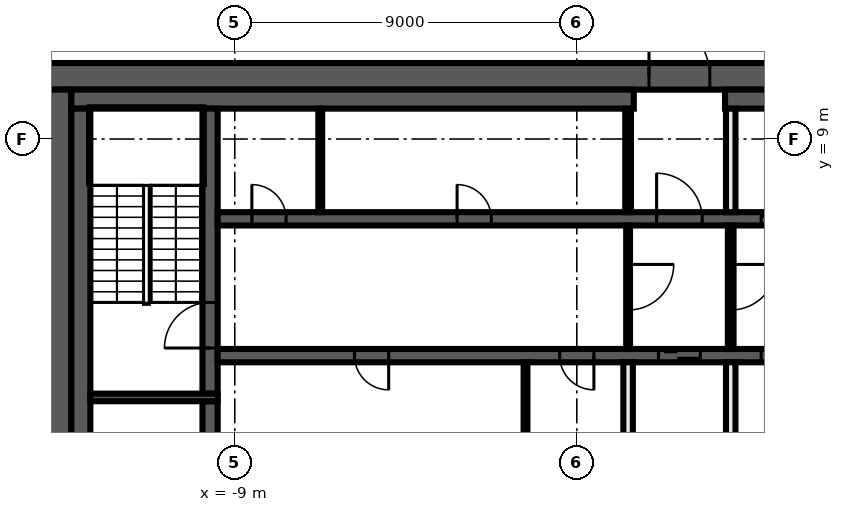
"""IFC4 building model, lengths in metres.
Left out: names, types, materials, properties, quantities, classifications, styles, units other than length and angle.
Written with IfcOpenShell. Run it as: python <this file> out.ifc"""

import sys

from ifc_helpers import new_model, si_unit, direction, frame, frame_2d, origin, place, context, subcontext, project, spatial, rectangle, extrude, element, fill, save


model = new_model("IFC4")
c1 = context("Model", 3, precision=1e-05, world=origin(), true_north=direction((0.0, 1.0)))
c2 = subcontext(c1, "Body", "Model", "MODEL_VIEW")
j1 = project(units=[si_unit("LENGTHUNIT", "METRE"), si_unit("PLANEANGLEUNIT", "RADIAN")], contexts=[c1])
p1 = place(None, origin())
s1 = spatial("IfcSite", under=j1, at=p1, CompositionType="ELEMENT")
p2 = place(p1, origin())
s2 = spatial("IfcBuilding", under=s1, at=p2, CompositionType="ELEMENT")
p3 = place(p2, frame((0.0, 0.0, 262.2)))
s3 = spatial("IfcBuildingStorey", under=s2, at=p3, CompositionType="ELEMENT", Elevation=262.2)
p4 = place(p3, frame((-14.0, 10.65, 0.0), z_axis=(0.0, 0.0, 1.0), x_axis=(1.0, 0.0, 0.0)))
e1 = element("IfcWall", 1, at=p4, inside=s3, PredefinedType="SHEAR", context=c2, shape_type="SweptSolid", body=[
    extrude(rectangle(XDim=28.0, YDim=0.7, at=frame_2d((14.0, 0.0))), origin(), (0.0, 0.0, 1.0), 3.82),
])
p5 = place(p4, frame((15.9, 0.0, 0.0)))
e2 = element("IfcOpeningElement", 2, at=p5, cuts=e1, PredefinedType="OPENING", context=c2, shape_type="SweptSolid", body=[
    extrude(rectangle(XDim=1.6, YDim=2.1, at=frame_2d((0.8, 1.05))), frame((0.0, 0.36, 0.0), z_axis=(0.0, -1.0, 0.0), x_axis=(1.0, 0.0, 0.0)), (0.0, 0.0, 1.0), 0.72),
])
p6 = place(p3, frame((-13.65, -10.3, 0.0), z_axis=(0.0, 0.0, 1.0), x_axis=(0.0, 1.0, 0.0)))
e3 = element("IfcWall", 3, at=p6, inside=s3, PredefinedType="SHEAR", context=c2, shape_type="SweptSolid", body=[
    extrude(rectangle(XDim=20.6, YDim=0.7, at=frame_2d((10.3, 0.0))), origin(), (0.0, 0.0, 1.0), 3.82),
])
p7 = place(p3, frame((-13.3, 10.05, 0.0), z_axis=(0.0, 0.0, 1.0), x_axis=(1.0, 0.0, 0.0)))
e4 = element("IfcWall", 4, at=p7, inside=s3, PredefinedType="SHEAR", context=c2, shape_type="SweptSolid", body=[
    extrude(rectangle(XDim=14.8, YDim=0.5, at=frame_2d((7.4, 0.0))), origin(), (0.0, 0.0, 1.0), 3.82),
])
p8 = place(p3, frame((3.9, 10.05, 0.0), z_axis=(0.0, 0.0, 1.0), x_axis=(1.0, 0.0, 0.0)))
e5 = element("IfcWall", 5, at=p8, inside=s3, PredefinedType="SHEAR", context=c2, shape_type="SweptSolid", body=[
    extrude(rectangle(XDim=9.4, YDim=0.5, at=frame_2d((4.7, 0.0))), origin(), (0.0, 0.0, 1.0), 3.82),
])
p9 = place(p3, frame((-13.05, -9.8, 0.0), z_axis=(0.0, 0.0, 1.0), x_axis=(0.0, 1.0, 0.0)))
e6 = element("IfcWall", 6, at=p9, inside=s3, PredefinedType="SHEAR", context=c2, shape_type="SweptSolid", body=[
    extrude(rectangle(XDim=19.6, YDim=0.5, at=frame_2d((9.8, 0.0))), origin(), (0.0, 0.0, 1.0), 3.82),
])
p10 = place(p3, frame((-9.65, -2.1, 0.0), z_axis=(0.0, 0.0, 1.0), x_axis=(0.0, 1.0, 0.0)))
e7 = element("IfcWall", 7, at=p10, inside=s3, PredefinedType="SHEAR", context=c2, shape_type="SweptSolid", body=[
    extrude(rectangle(XDim=4.2, YDim=0.4, at=frame_2d((2.1, 0.0))), origin(), (0.0, 0.0, 1.0), 3.82),
])
p11 = place(p3, frame((-9.65, 2.3, 0.0), z_axis=(0.0, 0.0, 1.0), x_axis=(0.0, 1.0, 0.0)))
e8 = element("IfcWall", 8, at=p11, inside=s3, PredefinedType="SHEAR", context=c2, shape_type="SweptSolid", body=[
    extrude(rectangle(XDim=7.5, YDim=0.4, at=frame_2d((3.75, 0.0))), origin(), (0.0, 0.0, 1.0), 3.82),
])
p12 = place(p11, frame((1.2, 0.0, 0.0)))
e9 = element("IfcOpeningElement", 9, at=p12, cuts=e8, PredefinedType="OPENING", context=c2, shape_type="SweptSolid", body=[
    extrude(rectangle(XDim=1.2, YDim=2.1, at=frame_2d((0.6, 1.05))), frame((0.0, 0.21, 0.0), z_axis=(0.0, -1.0, 0.0), x_axis=(1.0, 0.0, 0.0)), (0.0, 0.0, 1.0), 0.42),
])
p13 = place(p3, frame((-9.45, 2.2, 0.0), z_axis=(0.0, 0.0, 1.0), x_axis=(-1.0, 0.0, 0.0)))
e10 = element("IfcWall", 10, at=p13, inside=s3, PredefinedType="SHEAR", context=c2, shape_type="SweptSolid", body=[
    extrude(rectangle(XDim=3.35, YDim=0.2, at=frame_2d((1.675, 0.0))), origin(), (0.0, 0.0, 1.0), 3.82),
])
p14 = place(p3, frame((-9.45, 6.9, 0.0), z_axis=(0.0, 0.0, 1.0), x_axis=(1.0, 0.0, 0.0)))
e11 = element("IfcWall", 11, at=p14, inside=s3, PredefinedType="SHEAR", context=c2, shape_type="SweptSolid", body=[
    extrude(rectangle(XDim=18.9, YDim=0.35, at=frame_2d((9.45, 0.0))), origin(), (0.0, 0.0, 1.0), 3.82),
])
p15 = place(p14, frame((11.55, 0.0, 0.0)))
e12 = element("IfcOpeningElement", 12, at=p15, cuts=e11, PredefinedType="OPENING", context=c2, shape_type="SweptSolid", body=[
    extrude(rectangle(XDim=1.2, YDim=2.1, at=frame_2d((0.6, 1.05))), frame((0.0, 0.185, 0.0), z_axis=(0.0, -1.0, 0.0), x_axis=(1.0, 0.0, 0.0)), (0.0, 0.0, 1.0), 0.37),
])
p16 = place(p14, frame((14.3, 0.0, 0.0)))
e13 = element("IfcOpeningElement", 13, at=p16, cuts=e11, PredefinedType="OPENING", context=c2, shape_type="SweptSolid", body=[
    extrude(rectangle(XDim=1.1, YDim=2.1, at=frame_2d((0.55, 1.05))), frame((0.0, 0.185, 0.0), z_axis=(0.0, -1.0, 0.0), x_axis=(1.0, 0.0, 0.0)), (0.0, 0.0, 1.0), 0.37),
])
p17 = place(p14, frame((17.0, 0.0, 0.0)))
e14 = element("IfcOpeningElement", 14, at=p17, cuts=e11, PredefinedType="OPENING", context=c2, shape_type="SweptSolid", body=[
    extrude(rectangle(XDim=1.1, YDim=2.1, at=frame_2d((0.55, 1.05))), frame((0.0, 0.185, 0.0), z_axis=(0.0, -1.0, 0.0), x_axis=(1.0, 0.0, 0.0)), (0.0, 0.0, 1.0), 0.37),
])
p18 = place(p14, frame((0.9, 0.0, 0.0)))
e15 = element("IfcOpeningElement", 15, at=p18, cuts=e11, PredefinedType="OPENING", context=c2, shape_type="SweptSolid", body=[
    extrude(rectangle(XDim=0.9, YDim=2.1, at=frame_2d((0.45, 1.05))), frame((0.0, 0.185, 0.0), z_axis=(0.0, -1.0, 0.0), x_axis=(1.0, 0.0, 0.0)), (0.0, 0.0, 1.0), 0.37),
])
p19 = place(p14, frame((6.3, 0.0, 0.0)))
e16 = element("IfcOpeningElement", 16, at=p19, cuts=e11, PredefinedType="OPENING", context=c2, shape_type="SweptSolid", body=[
    extrude(rectangle(XDim=0.9, YDim=2.1, at=frame_2d((0.45, 1.05))), frame((0.0, 0.185, 0.0), z_axis=(0.0, -1.0, 0.0), x_axis=(1.0, 0.0, 0.0)), (0.0, 0.0, 1.0), 0.37),
])
p20 = place(p3, frame((9.45, 3.3, 0.0), z_axis=(0.0, 0.0, 1.0), x_axis=(-1.0, 0.0, 0.0)))
e17 = element("IfcWall", 17, at=p20, inside=s3, PredefinedType="SHEAR", context=c2, shape_type="SweptSolid", body=[
    extrude(rectangle(XDim=18.9, YDim=0.35, at=frame_2d((9.45, 0.0))), origin(), (0.0, 0.0, 1.0), 3.82),
])
p21 = place(p20, frame((6.2, 0.0, 0.0)))
e18 = element("IfcOpeningElement", 18, at=p21, cuts=e17, PredefinedType="OPENING", context=c2, shape_type="SweptSolid", body=[
    extrude(rectangle(XDim=1.1, YDim=2.1, at=frame_2d((0.55, 1.05))), frame((0.0, 0.185, 0.0), z_axis=(0.0, -1.0, 0.0), x_axis=(1.0, 0.0, 0.0)), (0.0, 0.0, 1.0), 0.37),
])
p22 = place(p20, frame((3.5, 0.0, 0.0)))
e19 = element("IfcOpeningElement", 19, at=p22, cuts=e17, PredefinedType="OPENING", context=c2, shape_type="SweptSolid", body=[
    extrude(rectangle(XDim=1.1, YDim=2.1, at=frame_2d((0.55, 1.05))), frame((0.0, 0.185, 0.0), z_axis=(0.0, -1.0, 0.0), x_axis=(1.0, 0.0, 0.0)), (0.0, 0.0, 1.0), 0.37),
])
p23 = place(p20, frame((0.9, 0.0, 0.0)))
e20 = element("IfcOpeningElement", 20, at=p23, cuts=e17, PredefinedType="OPENING", context=c2, shape_type="SweptSolid", body=[
    extrude(rectangle(XDim=0.9, YDim=2.1, at=frame_2d((0.45, 1.05))), frame((0.0, 0.185, 0.0), z_axis=(0.0, -1.0, 0.0), x_axis=(1.0, 0.0, 0.0)), (0.0, 0.0, 1.0), 0.37),
])
p24 = place(p20, frame((14.4, 0.0, 0.0)))
e21 = element("IfcOpeningElement", 21, at=p24, cuts=e17, PredefinedType="OPENING", context=c2, shape_type="SweptSolid", body=[
    extrude(rectangle(XDim=0.9, YDim=2.1, at=frame_2d((0.45, 1.05))), frame((0.0, 0.185, 0.0), z_axis=(0.0, -1.0, 0.0), x_axis=(1.0, 0.0, 0.0)), (0.0, 0.0, 1.0), 0.37),
])
p25 = place(p20, frame((9.0, 0.0, 0.0)))
e22 = element("IfcOpeningElement", 22, at=p25, cuts=e17, PredefinedType="OPENING", context=c2, shape_type="SweptSolid", body=[
    extrude(rectangle(XDim=0.9, YDim=2.1, at=frame_2d((0.45, 1.05))), frame((0.0, 0.185, 0.0), z_axis=(0.0, -1.0, 0.0), x_axis=(1.0, 0.0, 0.0)), (0.0, 0.0, 1.0), 0.37),
])
p26 = place(p3, frame((4.05, 6.725, 0.0), z_axis=(0.0, 0.0, 1.0), x_axis=(0.0, -1.0, 0.0)))
e23 = element("IfcWall", 23, at=p26, inside=s3, PredefinedType="PARTITIONING", context=c2, shape_type="SweptSolid", body=[
    extrude(rectangle(XDim=3.25, YDim=0.15, at=frame_2d((1.625, 0.0))), origin(), (0.0, 0.0, 1.0), 3.82),
])
p27 = place(p26, frame((1.025, 0.0, 0.0)))
e24 = element("IfcOpeningElement", 24, at=p27, cuts=e23, PredefinedType="OPENING", context=c2, shape_type="SweptSolid", body=[
    extrude(rectangle(XDim=1.2, YDim=2.1, at=frame_2d((0.6, 1.05))), frame((0.0, 0.085, 0.0), z_axis=(0.0, -1.0, 0.0), x_axis=(1.0, 0.0, 0.0)), (0.0, 0.0, 1.0), 0.17),
])
for number, where, z_axis, x_axis in (
    (25, (4.05, 0.4, 0.0), (0.0, 0.0, 1.0), (0.0, 1.0, 0.0)),
    (26, (4.05, 7.075, 0.0), (0.0, 0.0, 1.0), (0.0, 1.0, 0.0)),
):
    element("IfcWall", number, at=place(p3, frame(where, z_axis=z_axis, x_axis=x_axis)), inside=s3, PredefinedType="SOLIDWALL", context=c2, shape_type="SweptSolid", body=[
        extrude(rectangle(XDim=2.725, YDim=0.25, at=frame_2d((1.363, 0.0))), origin(), (0.0, 0.0, 1.0), 3.82),
    ])
p28 = place(p3, frame((1.35, 7.075, 0.0), z_axis=(0.0, 0.0, 1.0), x_axis=(0.0, 1.0, 0.0)))
e27 = element("IfcWall", 27, at=p28, inside=s3, PredefinedType="PARTITIONING", context=c2, shape_type="SweptSolid", body=[
    extrude(rectangle(XDim=2.725, YDim=0.15, at=frame_2d((1.363, 0.0))), origin(), (0.0, 0.0, 1.0), 3.82),
])
p29 = place(p3, frame((1.35, 6.725, 0.0), z_axis=(0.0, 0.0, 1.0), x_axis=(0.0, -1.0, 0.0)))
e28 = element("IfcWall", 28, at=p29, inside=s3, PredefinedType="PARTITIONING", context=c2, shape_type="SweptSolid", body=[
    extrude(rectangle(XDim=3.25, YDim=0.1, at=frame_2d((1.625, 0.0))), origin(), (0.0, 0.0, 1.0), 3.82),
])
p30 = place(p29, frame((1.025, 0.0, 0.0)))
e29 = element("IfcOpeningElement", 29, at=p30, cuts=e28, PredefinedType="OPENING", context=c2, shape_type="SweptSolid", body=[
    extrude(rectangle(XDim=1.2, YDim=2.1, at=frame_2d((0.6, 1.05))), frame((0.0, 0.06, 0.0), z_axis=(0.0, -1.0, 0.0), x_axis=(1.0, 0.0, 0.0)), (0.0, 0.0, 1.0), 0.12),
])
p31 = place(p3, frame((1.35, 0.4, 0.0), z_axis=(0.0, 0.0, 1.0), x_axis=(0.0, 1.0, 0.0)))
e30 = element("IfcWall", 30, at=p31, inside=s3, PredefinedType="SOLIDWALL", context=c2, shape_type="SweptSolid", body=[
    extrude(rectangle(XDim=2.725, YDim=0.25, at=frame_2d((1.363, 0.0))), origin(), (0.0, 0.0, 1.0), 3.82),
])
for number, where, z_axis, x_axis in (
    (31, (-1.35, 0.4, 0.0), (0.0, 0.0, 1.0), (0.0, 1.0, 0.0)),
    (32, (-6.75, 7.075, 0.0), (0.0, 0.0, 1.0), (0.0, 1.0, 0.0)),
):
    element("IfcWall", number, at=place(p3, frame(where, z_axis=z_axis, x_axis=x_axis)), inside=s3, PredefinedType="PARTITIONING", context=c2, shape_type="SweptSolid", body=[
        extrude(rectangle(XDim=2.725, YDim=0.1, at=frame_2d((1.363, 0.0))), origin(), (0.0, 0.0, 1.0), 3.82),
    ])
p32 = place(p5, origin())
e33 = element("IfcDoor", 33, at=p32, inside=s3, OperationType="DOUBLE_DOOR_SINGLE_SWING", PredefinedType="DOOR", context=c2, shape_type="SweptSolid", body=[
    extrude(rectangle(XDim=1.6, YDim=2.1, at=frame_2d((0.8, 1.05))), frame((0.0, 0.025, 0.0), z_axis=(0.0, -1.0, 0.0), x_axis=(1.0, 0.0, 0.0)), (0.0, 0.0, 1.0), 0.05),
])
fill(e2, e33)
p33 = place(p15, origin())
e34 = element("IfcDoor", 34, at=p33, inside=s3, OperationType="SINGLE_SWING_LEFT", PredefinedType="DOOR", context=c2, shape_type="SweptSolid", body=[
    extrude(rectangle(XDim=1.2, YDim=2.1, at=frame_2d((0.6, 1.05))), frame((0.0, 0.025, 0.0), z_axis=(0.0, -1.0, 0.0), x_axis=(1.0, 0.0, 0.0)), (0.0, 0.0, 1.0), 0.05),
])
fill(e12, e34)
p34 = place(p16, origin())
e35 = element("IfcDoor", 35, at=p34, inside=s3, OperationType="DOUBLE_DOOR_SLIDING", PredefinedType="DOOR", context=c2, shape_type="SweptSolid", body=[
    extrude(rectangle(XDim=1.1, YDim=2.1, at=frame_2d((0.55, 1.05))), frame((0.0, 0.025, 0.0), z_axis=(0.0, -1.0, 0.0), x_axis=(1.0, 0.0, 0.0)), (0.0, 0.0, 1.0), 0.05),
])
fill(e13, e35)
p35 = place(p21, origin())
e36 = element("IfcDoor", 36, at=p35, inside=s3, OperationType="DOUBLE_DOOR_SLIDING", PredefinedType="DOOR", context=c2, shape_type="SweptSolid", body=[
    extrude(rectangle(XDim=1.1, YDim=2.1, at=frame_2d((0.55, 1.05))), frame((0.0, 0.025, 0.0), z_axis=(0.0, -1.0, 0.0), x_axis=(1.0, 0.0, 0.0)), (0.0, 0.0, 1.0), 0.05),
])
fill(e18, e36)
p36 = place(p22, origin())
e37 = element("IfcDoor", 37, at=p36, inside=s3, OperationType="DOUBLE_DOOR_SLIDING", PredefinedType="DOOR", context=c2, shape_type="SweptSolid", body=[
    extrude(rectangle(XDim=1.1, YDim=2.1, at=frame_2d((0.55, 1.05))), frame((0.0, 0.025, 0.0), z_axis=(0.0, -1.0, 0.0), x_axis=(1.0, 0.0, 0.0)), (0.0, 0.0, 1.0), 0.05),
])
fill(e19, e37)
p37 = place(p18, origin())
e38 = element("IfcDoor", 38, at=p37, inside=s3, OperationType="SINGLE_SWING_RIGHT", PredefinedType="DOOR", context=c2, shape_type="SweptSolid", body=[
    extrude(rectangle(XDim=0.9, YDim=2.1, at=frame_2d((0.45, 1.05))), frame((0.0, 0.025, 0.0), z_axis=(0.0, -1.0, 0.0), x_axis=(1.0, 0.0, 0.0)), (0.0, 0.0, 1.0), 0.05),
])
fill(e15, e38)
p38 = place(p19, origin())
e39 = element("IfcDoor", 39, at=p38, inside=s3, OperationType="SINGLE_SWING_LEFT", PredefinedType="DOOR", context=c2, shape_type="SweptSolid", body=[
    extrude(rectangle(XDim=0.9, YDim=2.1, at=frame_2d((0.45, 1.05))), frame((0.0, 0.025, 0.0), z_axis=(0.0, -1.0, 0.0), x_axis=(1.0, 0.0, 0.0)), (0.0, 0.0, 1.0), 0.05),
])
fill(e16, e39)
p39 = place(p24, origin())
e40 = element("IfcDoor", 40, at=p39, inside=s3, OperationType="SINGLE_SWING_RIGHT", PredefinedType="DOOR", context=c2, shape_type="SweptSolid", body=[
    extrude(rectangle(XDim=0.9, YDim=2.1, at=frame_2d((0.45, 1.05))), frame((0.0, 0.025, 0.0), z_axis=(0.0, -1.0, 0.0), x_axis=(1.0, 0.0, 0.0)), (0.0, 0.0, 1.0), 0.05),
])
fill(e21, e40)
p40 = place(p25, origin())
e41 = element("IfcDoor", 41, at=p40, inside=s3, OperationType="SINGLE_SWING_LEFT", PredefinedType="DOOR", context=c2, shape_type="SweptSolid", body=[
    extrude(rectangle(XDim=0.9, YDim=2.1, at=frame_2d((0.45, 1.05))), frame((0.0, 0.025, 0.0), z_axis=(0.0, -1.0, 0.0), x_axis=(1.0, 0.0, 0.0)), (0.0, 0.0, 1.0), 0.05),
])
fill(e22, e41)
p41 = place(p12, origin())
e42 = element("IfcDoor", 42, at=p41, inside=s3, OperationType="SINGLE_SWING_RIGHT", PredefinedType="DOOR", context=c2, shape_type="SweptSolid", body=[
    extrude(rectangle(XDim=1.2, YDim=2.1, at=frame_2d((0.6, 1.05))), frame((0.0, 0.025, 0.0), z_axis=(0.0, -1.0, 0.0), x_axis=(1.0, 0.0, 0.0)), (0.0, 0.0, 1.0), 0.05),
])
fill(e9, e42)
p42 = place(p30, origin())
e43 = element("IfcDoor", 43, at=p42, inside=s3, OperationType="SINGLE_SWING_LEFT", PredefinedType="DOOR", context=c2, shape_type="SweptSolid", body=[
    extrude(rectangle(XDim=1.2, YDim=2.1, at=frame_2d((0.6, 1.05))), frame((0.0, 0.025, 0.0), z_axis=(0.0, -1.0, 0.0), x_axis=(1.0, 0.0, 0.0)), (0.0, 0.0, 1.0), 0.05),
])
fill(e29, e43)
p43 = place(p27, origin())
e44 = element("IfcDoor", 44, at=p43, inside=s3, OperationType="SINGLE_SWING_RIGHT", PredefinedType="DOOR", context=c2, shape_type="SweptSolid", body=[
    extrude(rectangle(XDim=1.2, YDim=2.1, at=frame_2d((0.6, 1.05))), frame((0.0, 0.025, 0.0), z_axis=(0.0, -1.0, 0.0), x_axis=(1.0, 0.0, 0.0)), (0.0, 0.0, 1.0), 0.05),
])
fill(e24, e44)
save(model, sys.argv[1])
